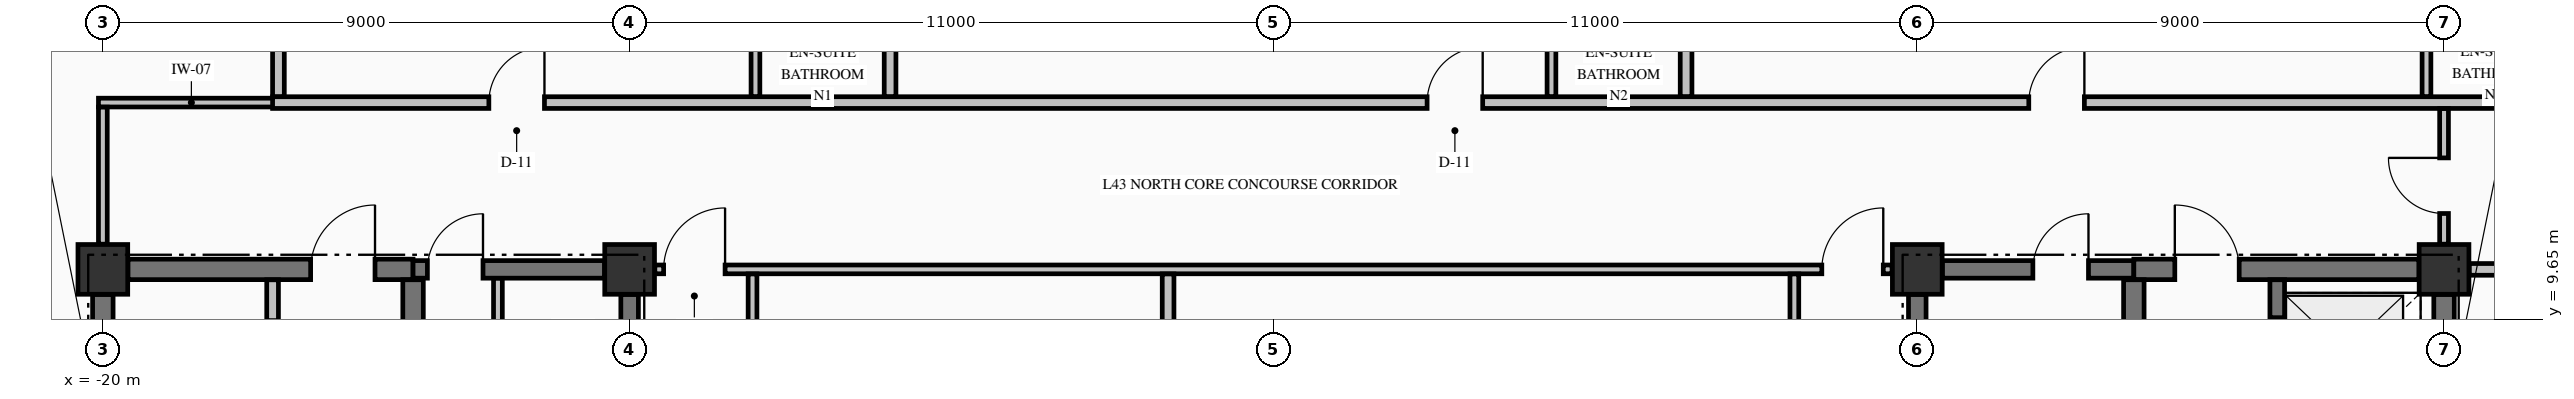
"""IFC4 building model, lengths in metres.
Left out: names, types, materials, properties, quantities, classifications, styles, units other than length and angle.
Written with IfcOpenShell. Run it as: python <this file> out.ifc"""

import sys

from ifc_helpers import new_model, si_unit, direction, frame, frame_2d, origin, origin_2d, place, context, subcontext, project, spatial, rectangle, extrude, element, fill, save


model = new_model("IFC4")
c1 = context("Model", 3, precision=1e-05, world=origin(), true_north=direction((0.0, 1.0)))
c2 = subcontext(c1, "Body", "Model", "MODEL_VIEW")
j1 = project(units=[si_unit("LENGTHUNIT", "METRE"), si_unit("PLANEANGLEUNIT", "RADIAN")], contexts=[c1])
p1 = place(None, origin())
s1 = spatial("IfcSite", under=j1, at=p1, CompositionType="ELEMENT")
p2 = place(p1, origin())
s2 = spatial("IfcBuilding", under=s1, at=p2, CompositionType="ELEMENT")
p3 = place(p2, frame((0.0, 0.0, 169.46)))
s3 = spatial("IfcBuildingStorey", under=s2, at=p3, CompositionType="ELEMENT", Elevation=169.46)
for number, where, z_axis, x_axis in (
    (1, (-20.0, 10.5, -0.25), (0.0, 0.0, 1.0), (1.0, 0.0, 0.0)),
    (2, (-11.0, 10.5, -0.25), (0.0, 0.0, 1.0), (1.0, 0.0, 0.0)),
    (3, (11.0, 10.5, -0.25), (0.0, 0.0, 1.0), (1.0, 0.0, 0.0)),
    (4, (20.0, 10.5, -0.25), (0.0, 0.0, 1.0), (1.0, 0.0, 0.0)),
):
    element("IfcColumn", number, at=place(p3, frame(where, z_axis=z_axis, x_axis=x_axis)), inside=s3, PredefinedType="COLUMN", context=c2, shape_type="SweptSolid", body=[
        extrude(rectangle(XDim=0.85, YDim=0.85, at=origin_2d()), origin(), (0.0, 0.0, 1.0), 3.4),
    ])
p4 = place(p3, frame((-19.571, 10.5, 0.0), z_axis=(0.0, 0.0, 1.0), x_axis=(1.0, 0.0, 0.0)))
e5 = element("IfcWall", 5, at=p4, inside=s3, PredefinedType="SHEAR", context=c2, shape_type="SweptSolid", body=[
    extrude(rectangle(XDim=4.871, YDim=0.35, at=frame_2d((2.436, 0.0))), origin(), (0.0, 0.0, 1.0), 3.15),
])
p5 = place(p4, frame((3.121, 0.0, 0.0)))
e6 = element("IfcOpeningElement", 6, at=p5, cuts=e5, PredefinedType="OPENING", context=c2, shape_type="SweptSolid", body=[
    extrude(rectangle(XDim=1.1, YDim=2.15, at=frame_2d((0.55, 1.075))), frame((0.0, 0.185, 0.0), z_axis=(0.0, -1.0, 0.0), x_axis=(1.0, 0.0, 0.0)), (0.0, 0.0, 1.0), 0.37),
])
p6 = place(p3, frame((-14.7, 10.5, 0.0), z_axis=(0.0, 0.0, 1.0), x_axis=(1.0, 0.0, 0.0)))
e7 = element("IfcWall", 7, at=p6, inside=s3, PredefinedType="SHEAR", context=c2, shape_type="SweptSolid", body=[
    extrude(rectangle(XDim=3.271, YDim=0.3, at=frame_2d((1.635, 0.0))), origin(), (0.0, 0.0, 1.0), 3.15),
])
p7 = place(p6, frame((0.245, 0.0, 0.0)))
e8 = element("IfcOpeningElement", 8, at=p7, cuts=e7, PredefinedType="OPENING", context=c2, shape_type="SweptSolid", body=[
    extrude(rectangle(XDim=0.95, YDim=2.15, at=frame_2d((0.475, 1.075))), frame((0.0, 0.16, 0.0), z_axis=(0.0, -1.0, 0.0), x_axis=(1.0, 0.0, 0.0)), (0.0, 0.0, 1.0), 0.32),
])
p8 = place(p3, frame((11.429, 10.5, 0.0), z_axis=(0.0, 0.0, 1.0), x_axis=(1.0, 0.0, 0.0)))
e9 = element("IfcWall", 9, at=p8, inside=s3, PredefinedType="SHEAR", context=c2, shape_type="SweptSolid", body=[
    extrude(rectangle(XDim=3.271, YDim=0.3, at=frame_2d((1.635, 0.0))), origin(), (0.0, 0.0, 1.0), 3.15),
])
p9 = place(p8, frame((1.546, 0.0, 0.0)))
e10 = element("IfcOpeningElement", 10, at=p9, cuts=e9, PredefinedType="OPENING", context=c2, shape_type="SweptSolid", body=[
    extrude(rectangle(XDim=0.95, YDim=2.15, at=frame_2d((0.475, 1.075))), frame((0.0, 0.16, 0.0), z_axis=(0.0, -1.0, 0.0), x_axis=(1.0, 0.0, 0.0)), (0.0, 0.0, 1.0), 0.32),
])
p10 = place(p3, frame((14.7, 10.5, 0.0), z_axis=(0.0, 0.0, 1.0), x_axis=(1.0, 0.0, 0.0)))
e11 = element("IfcWall", 11, at=p10, inside=s3, PredefinedType="SHEAR", context=c2, shape_type="SweptSolid", body=[
    extrude(rectangle(XDim=4.871, YDim=0.35, at=frame_2d((2.436, 0.0))), origin(), (0.0, 0.0, 1.0), 3.15),
])
p11 = place(p10, frame((0.7, 0.0, 0.0)))
e12 = element("IfcOpeningElement", 12, at=p11, cuts=e11, PredefinedType="OPENING", context=c2, shape_type="SweptSolid", body=[
    extrude(rectangle(XDim=1.1, YDim=2.15, at=frame_2d((0.55, 1.075))), frame((0.0, 0.185, 0.0), z_axis=(0.0, -1.0, 0.0), x_axis=(1.0, 0.0, 0.0)), (0.0, 0.0, 1.0), 0.37),
])
p12 = place(p3, frame((-10.569, 10.5, 0.0), z_axis=(0.0, 0.0, 1.0), x_axis=(1.0, 0.0, 0.0)))
e13 = element("IfcWall", 13, at=p12, inside=s3, PredefinedType="PARTITIONING", context=c2, shape_type="SweptSolid", body=[
    extrude(rectangle(XDim=21.138, YDim=0.15, at=frame_2d((10.569, 0.0))), origin(), (0.0, 0.0, 1.0), 3.15),
])
p13 = place(p12, frame((0.15, 0.0, 0.0)))
e14 = element("IfcOpeningElement", 14, at=p13, cuts=e13, PredefinedType="OPENING", context=c2, shape_type="SweptSolid", body=[
    extrude(rectangle(XDim=1.05, YDim=2.15, at=frame_2d((0.525, 1.075))), frame((0.0, 0.085, 0.0), z_axis=(0.0, -1.0, 0.0), x_axis=(1.0, 0.0, 0.0)), (0.0, 0.0, 1.0), 0.17),
])
p14 = place(p12, frame((19.938, 0.0, 0.0)))
e15 = element("IfcOpeningElement", 15, at=p14, cuts=e13, PredefinedType="OPENING", context=c2, shape_type="SweptSolid", body=[
    extrude(rectangle(XDim=1.05, YDim=2.15, at=frame_2d((0.525, 1.075))), frame((0.0, 0.085, 0.0), z_axis=(0.0, -1.0, 0.0), x_axis=(1.0, 0.0, 0.0)), (0.0, 0.0, 1.0), 0.17),
])
p15 = place(p3, frame((20.431, 10.5, 0.0), z_axis=(0.0, 0.0, 1.0), x_axis=(1.0, 0.0, 0.0)))
e16 = element("IfcWall", 16, at=p15, inside=s3, PredefinedType="PARTITIONING", context=c2, shape_type="SweptSolid", body=[
    extrude(rectangle(XDim=6.404, YDim=0.2, at=frame_2d((3.202, 0.0))), origin(), (0.0, 0.0, 1.0), 3.15),
])
p16 = place(p15, frame((2.594, 0.0, 0.0)))
e17 = element("IfcOpeningElement", 17, at=p16, cuts=e16, PredefinedType="OPENING", context=c2, shape_type="SweptSolid", body=[
    extrude(rectangle(XDim=0.95, YDim=2.15, at=frame_2d((0.475, 1.075))), frame((0.0, 0.11, 0.0), z_axis=(0.0, -1.0, 0.0), x_axis=(1.0, 0.0, 0.0)), (0.0, 0.0, 1.0), 0.22),
])
p17 = place(p3, frame((-20.075, 13.35, 0.0), z_axis=(0.0, 0.0, 1.0), x_axis=(1.0, 0.0, 0.0)))
e18 = element("IfcWall", 18, at=p17, inside=s3, PredefinedType="PARTITIONING", context=c2, shape_type="SweptSolid", body=[
    extrude(rectangle(XDim=3.175, YDim=0.15, at=frame_2d((1.587, 0.0))), origin(), (0.0, 0.0, 1.0), 3.15),
])
p18 = place(p3, frame((-17.1, 13.35, 0.0), z_axis=(0.0, 0.0, 1.0), x_axis=(1.0, 0.0, 0.0)))
e19 = element("IfcWall", 19, at=p18, inside=s3, PredefinedType="PARTITIONING", context=c2, shape_type="SweptSolid", body=[
    extrude(rectangle(XDim=39.2, YDim=0.2, at=frame_2d((19.6, 0.0))), origin(), (0.0, 0.0, 1.0), 3.15),
])
p19 = place(p18, frame((3.695, 0.0, 0.0)))
e20 = element("IfcOpeningElement", 20, at=p19, cuts=e19, PredefinedType="OPENING", context=c2, shape_type="SweptSolid", body=[
    extrude(rectangle(XDim=0.95, YDim=2.15, at=frame_2d((0.475, 1.075))), frame((0.0, 0.11, 0.0), z_axis=(0.0, -1.0, 0.0), x_axis=(1.0, 0.0, 0.0)), (0.0, 0.0, 1.0), 0.22),
])
p20 = place(p18, frame((19.725, 0.0, 0.0)))
e21 = element("IfcOpeningElement", 21, at=p20, cuts=e19, PredefinedType="OPENING", context=c2, shape_type="SweptSolid", body=[
    extrude(rectangle(XDim=0.95, YDim=2.15, at=frame_2d((0.475, 1.075))), frame((0.0, 0.11, 0.0), z_axis=(0.0, -1.0, 0.0), x_axis=(1.0, 0.0, 0.0)), (0.0, 0.0, 1.0), 0.22),
])
p21 = place(p18, frame((30.005, 0.0, 0.0)))
e22 = element("IfcOpeningElement", 22, at=p21, cuts=e19, PredefinedType="OPENING", context=c2, shape_type="SweptSolid", body=[
    extrude(rectangle(XDim=0.95, YDim=2.15, at=frame_2d((0.475, 1.075))), frame((0.0, 0.11, 0.0), z_axis=(0.0, -1.0, 0.0), x_axis=(1.0, 0.0, 0.0)), (0.0, 0.0, 1.0), 0.22),
])
p22 = place(p3, frame((-20.0, 5.327, 0.0), z_axis=(0.0, 0.0, 1.0), x_axis=(0.0, 1.0, 0.0)))
e23 = element("IfcWall", 23, at=p22, inside=s3, PredefinedType="SHEAR", context=c2, shape_type="SweptSolid", body=[
    extrude(rectangle(XDim=4.744, YDim=0.35, at=frame_2d((2.372, 0.0))), origin(), (0.0, 0.0, 1.0), 3.15),
])
p23 = place(p3, frame((-14.7, 5.852, 0.0), z_axis=(0.0, 0.0, 1.0), x_axis=(0.0, 1.0, 0.0)))
e24 = element("IfcWall", 24, at=p23, inside=s3, PredefinedType="SHEAR", context=c2, shape_type="SweptSolid", body=[
    extrude(rectangle(XDim=4.471, YDim=0.35, at=frame_2d((2.235, 0.0))), origin(), (0.0, 0.0, 1.0), 3.15),
])
for number, where, z_axis, x_axis in (
    (25, (-11.0, 5.852, 0.0), (0.0, 0.0, 1.0), (0.0, 1.0, 0.0)),
    (26, (11.0, 5.852, 0.0), (0.0, 0.0, 1.0), (0.0, 1.0, 0.0)),
):
    element("IfcWall", number, at=place(p3, frame(where, z_axis=z_axis, x_axis=x_axis)), inside=s3, PredefinedType="SHEAR", context=c2, shape_type="SweptSolid", body=[
        extrude(rectangle(XDim=4.219, YDim=0.3, at=frame_2d((2.109, 0.0))), origin(), (0.0, 0.0, 1.0), 3.15),
    ])
p24 = place(p3, frame((14.7, 5.852, 0.0), z_axis=(0.0, 0.0, 1.0), x_axis=(0.0, 1.0, 0.0)))
e27 = element("IfcWall", 27, at=p24, inside=s3, PredefinedType="SHEAR", context=c2, shape_type="SweptSolid", body=[
    extrude(rectangle(XDim=4.471, YDim=0.35, at=frame_2d((2.235, 0.0))), origin(), (0.0, 0.0, 1.0), 3.15),
])
p25 = place(p3, frame((17.15, 7.877, 0.0), z_axis=(0.0, 0.0, 1.0), x_axis=(0.0, 1.0, 0.0)))
e28 = element("IfcWall", 28, at=p25, inside=s3, PredefinedType="SOLIDWALL", context=c2, shape_type="SweptSolid", body=[
    extrude(rectangle(XDim=2.446, YDim=0.25, at=frame_2d((1.223, 0.0))), origin(), (0.0, 0.0, 1.0), 3.15),
])
p26 = place(p25, frame((0.698, 0.0, 0.0)))
e29 = element("IfcOpeningElement", 29, at=p26, cuts=e28, PredefinedType="OPENING", context=c2, shape_type="SweptSolid", body=[
    extrude(rectangle(XDim=1.1, YDim=2.2, at=frame_2d((0.55, 1.1))), frame((0.0, 0.135, 0.0), z_axis=(0.0, -1.0, 0.0), x_axis=(1.0, 0.0, 0.0)), (0.0, 0.0, 1.0), 0.27),
])
p27 = place(p3, frame((20.0, 7.877, 0.0), z_axis=(0.0, 0.0, 1.0), x_axis=(0.0, 1.0, 0.0)))
e30 = element("IfcWall", 30, at=p27, inside=s3, PredefinedType="SHEAR", context=c2, shape_type="SweptSolid", body=[
    extrude(rectangle(XDim=2.194, YDim=0.35, at=frame_2d((1.097, 0.0))), origin(), (0.0, 0.0, 1.0), 3.15),
])
p28 = place(p3, frame((-20.0, 10.931, 0.0), z_axis=(0.0, 0.0, 1.0), x_axis=(0.0, 1.0, 0.0)))
e31 = element("IfcWall", 31, at=p28, inside=s3, PredefinedType="PARTITIONING", context=c2, shape_type="SweptSolid", body=[
    extrude(rectangle(XDim=2.341, YDim=0.15, at=frame_2d((1.17, 0.0))), origin(), (0.0, 0.0, 1.0), 2.342),
])
p29 = place(p3, frame((-17.1, 7.928, 0.0), z_axis=(0.0, 0.0, 1.0), x_axis=(0.0, 1.0, 0.0)))
e32 = element("IfcWall", 32, at=p29, inside=s3, PredefinedType="PARTITIONING", context=c2, shape_type="SweptSolid", body=[
    extrude(rectangle(XDim=2.394, YDim=0.2, at=frame_2d((1.197, 0.0))), origin(), (0.0, 0.0, 1.0), 3.15),
])
p30 = place(p29, frame((0.747, 0.0, 0.0)))
e33 = element("IfcOpeningElement", 33, at=p30, cuts=e32, PredefinedType="OPENING", context=c2, shape_type="SweptSolid", body=[
    extrude(rectangle(XDim=0.95, YDim=2.15, at=frame_2d((0.475, 1.075))), frame((0.0, 0.11, 0.0), z_axis=(0.0, -1.0, 0.0), x_axis=(1.0, 0.0, 0.0)), (0.0, 0.0, 1.0), 0.22),
])
p31 = place(p3, frame((-17.0, 13.453, 0.0), z_axis=(0.0, 0.0, 1.0), x_axis=(0.0, 1.0, 0.0)))
e34 = element("IfcWall", 34, at=p31, inside=s3, PredefinedType="PARTITIONING", context=c2, shape_type="SweptSolid", body=[
    extrude(rectangle(XDim=5.541, YDim=0.2, at=frame_2d((2.771, 0.0))), origin(), (0.0, 0.0, 1.0), 3.15),
])
p32 = place(p3, frame((-13.25, 5.853, 0.0), z_axis=(0.0, 0.0, 1.0), x_axis=(0.0, 1.0, 0.0)))
e35 = element("IfcWall", 35, at=p32, inside=s3, PredefinedType="PARTITIONING", context=c2, shape_type="SweptSolid", body=[
    extrude(rectangle(XDim=4.494, YDim=0.15, at=frame_2d((2.247, 0.0))), origin(), (0.0, 0.0, 1.0), 3.15),
])
p33 = place(p32, frame((1.472, 0.0, 0.0)))
e36 = element("IfcOpeningElement", 36, at=p33, cuts=e35, PredefinedType="OPENING", context=c2, shape_type="SweptSolid", body=[
    extrude(rectangle(XDim=0.95, YDim=2.15, at=frame_2d((0.475, 1.075))), frame((0.0, 0.085, 0.0), z_axis=(0.0, -1.0, 0.0), x_axis=(1.0, 0.0, 0.0)), (0.0, 0.0, 1.0), 0.17),
])
p34 = place(p3, frame((-8.9, 4.053, 0.0), z_axis=(0.0, 0.0, 1.0), x_axis=(0.0, 1.0, 0.0)))
e37 = element("IfcWall", 37, at=p34, inside=s3, PredefinedType="PARTITIONING", context=c2, shape_type="SweptSolid", body=[
    extrude(rectangle(XDim=6.369, YDim=0.15, at=frame_2d((3.185, 0.0))), origin(), (0.0, 0.0, 1.0), 3.15),
])
p35 = place(p34, frame((2.667, 0.0, 0.0)))
e38 = element("IfcOpeningElement", 38, at=p35, cuts=e37, PredefinedType="OPENING", context=c2, shape_type="SweptSolid", body=[
    extrude(rectangle(XDim=1.0, YDim=2.15, at=frame_2d((0.5, 1.075))), frame((0.0, 0.085, 0.0), z_axis=(0.0, -1.0, 0.0), x_axis=(1.0, 0.0, 0.0)), (0.0, 0.0, 1.0), 0.17),
])
p36 = place(p3, frame((-8.85, 13.453, 0.0), z_axis=(0.0, 0.0, 1.0), x_axis=(0.0, 1.0, 0.0)))
e39 = element("IfcWall", 39, at=p36, inside=s3, PredefinedType="PARTITIONING", context=c2, shape_type="SweptSolid", body=[
    extrude(rectangle(XDim=2.069, YDim=0.15, at=frame_2d((1.035, 0.0))), origin(), (0.0, 0.0, 1.0), 3.15),
])
p37 = place(p3, frame((-6.55, 13.453, 0.0), z_axis=(0.0, 0.0, 1.0), x_axis=(0.0, 1.0, 0.0)))
e40 = element("IfcWall", 40, at=p37, inside=s3, PredefinedType="PARTITIONING", context=c2, shape_type="SweptSolid", body=[
    extrude(rectangle(XDim=2.069, YDim=0.2, at=frame_2d((1.035, 0.0))), origin(), (0.0, 0.0, 1.0), 3.15),
])
p38 = place(p3, frame((-1.8, 4.053, 0.0), z_axis=(0.0, 0.0, 1.0), x_axis=(0.0, 1.0, 0.0)))
e41 = element("IfcWall", 41, at=p38, inside=s3, PredefinedType="PARTITIONING", context=c2, shape_type="SweptSolid", body=[
    extrude(rectangle(XDim=6.369, YDim=0.2, at=frame_2d((3.185, 0.0))), origin(), (0.0, 0.0, 1.0), 3.15),
])
p39 = place(p3, frame((4.75, 13.453, 0.0), z_axis=(0.0, 0.0, 1.0), x_axis=(0.0, 1.0, 0.0)))
e42 = element("IfcWall", 42, at=p39, inside=s3, PredefinedType="PARTITIONING", context=c2, shape_type="SweptSolid", body=[
    extrude(rectangle(XDim=2.069, YDim=0.15, at=frame_2d((1.035, 0.0))), origin(), (0.0, 0.0, 1.0), 3.15),
])
p40 = place(p3, frame((7.05, 13.453, 0.0), z_axis=(0.0, 0.0, 1.0), x_axis=(0.0, 1.0, 0.0)))
e43 = element("IfcWall", 43, at=p40, inside=s3, PredefinedType="PARTITIONING", context=c2, shape_type="SweptSolid", body=[
    extrude(rectangle(XDim=2.069, YDim=0.2, at=frame_2d((1.035, 0.0))), origin(), (0.0, 0.0, 1.0), 3.15),
])
p41 = place(p3, frame((8.9, -1.497, 0.0), z_axis=(0.0, 0.0, 1.0), x_axis=(0.0, 1.0, 0.0)))
e44 = element("IfcWall", 44, at=p41, inside=s3, PredefinedType="PARTITIONING", context=c2, shape_type="SweptSolid", body=[
    extrude(rectangle(XDim=11.919, YDim=0.15, at=frame_2d((5.959, 0.0))), origin(), (0.0, 0.0, 1.0), 3.15),
])
p42 = place(p41, frame((5.397, 0.0, 0.0)))
e45 = element("IfcOpeningElement", 45, at=p42, cuts=e44, PredefinedType="OPENING", context=c2, shape_type="SweptSolid", body=[
    extrude(rectangle(XDim=1.1, YDim=2.15, at=frame_2d((0.55, 1.075))), frame((0.0, 0.085, 0.0), z_axis=(0.0, -1.0, 0.0), x_axis=(1.0, 0.0, 0.0)), (0.0, 0.0, 1.0), 0.17),
])
p43 = place(p3, frame((19.7, 13.453, 0.0), z_axis=(0.0, 0.0, 1.0), x_axis=(0.0, 1.0, 0.0)))
e46 = element("IfcWall", 46, at=p43, inside=s3, PredefinedType="PARTITIONING", context=c2, shape_type="SweptSolid", body=[
    extrude(rectangle(XDim=2.069, YDim=0.15, at=frame_2d((1.035, 0.0))), origin(), (0.0, 0.0, 1.0), 2.342),
])
p44 = place(p3, frame((20.0, 10.931, 0.0), z_axis=(0.0, 0.0, 1.0), x_axis=(0.0, 1.0, 0.0)))
e47 = element("IfcWall", 47, at=p44, inside=s3, PredefinedType="PARTITIONING", context=c2, shape_type="SweptSolid", body=[
    extrude(rectangle(XDim=2.316, YDim=0.15, at=frame_2d((1.158, 0.0))), origin(), (0.0, 0.0, 1.0), 2.342),
])
p45 = place(p44, frame((0.524, 0.0, 0.0)))
e48 = element("IfcOpeningElement", 48, at=p45, cuts=e47, PredefinedType="OPENING", context=c2, shape_type="SweptSolid", body=[
    extrude(rectangle(XDim=0.95, YDim=2.15, at=frame_2d((0.475, 1.075))), frame((0.0, 0.085, 0.0), z_axis=(0.0, -1.0, 0.0), x_axis=(1.0, 0.0, 0.0)), (0.0, 0.0, 1.0), 0.17),
])
p46 = place(p7, origin())
e49 = element("IfcDoor", 49, at=p46, inside=s3, OperationType="SINGLE_SWING_RIGHT", PredefinedType="DOOR", context=c2, shape_type="SweptSolid", body=[
    extrude(rectangle(XDim=0.95, YDim=2.15, at=frame_2d((0.475, 1.075))), frame((0.0, 0.025, 0.0), z_axis=(0.0, -1.0, 0.0), x_axis=(1.0, 0.0, 0.0)), (0.0, 0.0, 1.0), 0.05),
])
fill(e8, e49)
p47 = place(p9, origin())
e50 = element("IfcDoor", 50, at=p47, inside=s3, OperationType="SINGLE_SWING_RIGHT", PredefinedType="DOOR", context=c2, shape_type="SweptSolid", body=[
    extrude(rectangle(XDim=0.95, YDim=2.15, at=frame_2d((0.475, 1.075))), frame((0.0, 0.025, 0.0), z_axis=(0.0, -1.0, 0.0), x_axis=(1.0, 0.0, 0.0)), (0.0, 0.0, 1.0), 0.05),
])
fill(e10, e50)
p48 = place(p5, origin())
e51 = element("IfcDoor", 51, at=p48, inside=s3, OperationType="SINGLE_SWING_RIGHT", PredefinedType="DOOR", context=c2, shape_type="SweptSolid", body=[
    extrude(rectangle(XDim=1.1, YDim=2.15, at=frame_2d((0.55, 1.075))), frame((0.0, 0.025, 0.0), z_axis=(0.0, -1.0, 0.0), x_axis=(1.0, 0.0, 0.0)), (0.0, 0.0, 1.0), 0.05),
])
fill(e6, e51)
p49 = place(p26, origin())
e52 = element("IfcDoor", 52, at=p49, inside=s3, OperationType="SLIDING_TO_RIGHT", PredefinedType="DOOR", context=c2, shape_type="SweptSolid", body=[
    extrude(rectangle(XDim=1.1, YDim=2.2, at=frame_2d((0.55, 1.1))), frame((0.0, 0.025, 0.0), z_axis=(0.0, -1.0, 0.0), x_axis=(1.0, 0.0, 0.0)), (0.0, 0.0, 1.0), 0.05),
])
fill(e29, e52)
p50 = place(p11, origin())
e53 = element("IfcDoor", 53, at=p50, inside=s3, OperationType="SINGLE_SWING_LEFT", PredefinedType="DOOR", context=c2, shape_type="SweptSolid", body=[
    extrude(rectangle(XDim=1.1, YDim=2.15, at=frame_2d((0.55, 1.075))), frame((0.0, 0.025, 0.0), z_axis=(0.0, -1.0, 0.0), x_axis=(1.0, 0.0, 0.0)), (0.0, 0.0, 1.0), 0.05),
])
fill(e12, e53)
p51 = place(p13, origin())
e54 = element("IfcDoor", 54, at=p51, inside=s3, OperationType="SINGLE_SWING_RIGHT", PredefinedType="DOOR", context=c2, shape_type="SweptSolid", body=[
    extrude(rectangle(XDim=1.05, YDim=2.15, at=frame_2d((0.525, 1.075))), frame((0.0, 0.025, 0.0), z_axis=(0.0, -1.0, 0.0), x_axis=(1.0, 0.0, 0.0)), (0.0, 0.0, 1.0), 0.05),
])
fill(e14, e54)
p52 = place(p14, origin())
e55 = element("IfcDoor", 55, at=p52, inside=s3, OperationType="SINGLE_SWING_RIGHT", PredefinedType="DOOR", context=c2, shape_type="SweptSolid", body=[
    extrude(rectangle(XDim=1.05, YDim=2.15, at=frame_2d((0.525, 1.075))), frame((0.0, 0.025, 0.0), z_axis=(0.0, -1.0, 0.0), x_axis=(1.0, 0.0, 0.0)), (0.0, 0.0, 1.0), 0.05),
])
fill(e15, e55)
p53 = place(p19, origin())
e56 = element("IfcDoor", 56, at=p53, inside=s3, OperationType="SINGLE_SWING_RIGHT", PredefinedType="DOOR", context=c2, shape_type="SweptSolid", body=[
    extrude(rectangle(XDim=0.95, YDim=2.15, at=frame_2d((0.475, 1.075))), frame((0.0, 0.025, 0.0), z_axis=(0.0, -1.0, 0.0), x_axis=(1.0, 0.0, 0.0)), (0.0, 0.0, 1.0), 0.05),
])
fill(e20, e56)
p54 = place(p20, origin())
e57 = element("IfcDoor", 57, at=p54, inside=s3, OperationType="SINGLE_SWING_RIGHT", PredefinedType="DOOR", context=c2, shape_type="SweptSolid", body=[
    extrude(rectangle(XDim=0.95, YDim=2.15, at=frame_2d((0.475, 1.075))), frame((0.0, 0.025, 0.0), z_axis=(0.0, -1.0, 0.0), x_axis=(1.0, 0.0, 0.0)), (0.0, 0.0, 1.0), 0.05),
])
fill(e21, e57)
p55 = place(p21, origin())
e58 = element("IfcDoor", 58, at=p55, inside=s3, OperationType="SINGLE_SWING_RIGHT", PredefinedType="DOOR", context=c2, shape_type="SweptSolid", body=[
    extrude(rectangle(XDim=0.95, YDim=2.15, at=frame_2d((0.475, 1.075))), frame((0.0, 0.025, 0.0), z_axis=(0.0, -1.0, 0.0), x_axis=(1.0, 0.0, 0.0)), (0.0, 0.0, 1.0), 0.05),
])
fill(e22, e58)
p56 = place(p45, origin())
e59 = element("IfcDoor", 59, at=p56, inside=s3, OperationType="SINGLE_SWING_RIGHT", PredefinedType="DOOR", context=c2, shape_type="SweptSolid", body=[
    extrude(rectangle(XDim=0.95, YDim=2.15, at=frame_2d((0.475, 1.075))), frame((0.0, 0.025, 0.0), z_axis=(0.0, -1.0, 0.0), x_axis=(1.0, 0.0, 0.0)), (0.0, 0.0, 1.0), 0.05),
])
fill(e48, e59)
save(model, sys.argv[1])
